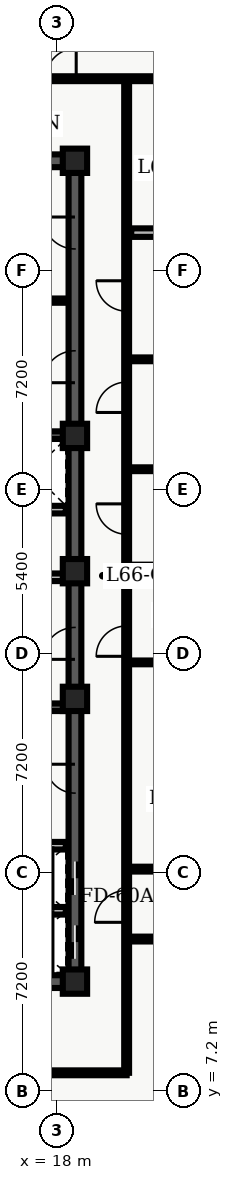
"""IFC4 building model, lengths in metres.
Left out: names, types, materials, properties, quantities, classifications, styles, units other than length and angle.
Written with IfcOpenShell. Run it as: python <this file> out.ifc"""

import sys

from ifc_helpers import new_model, entity, si_unit, converted_unit, direction, frame, origin_with_axes, origin_2d_with_axis, place, context, subcontext, project, spatial, polyline, rectangle, outline, extrude, element, fill, save


model = new_model("IFC4")
c1 = context("Model", 3, precision=1e-05, world=origin_with_axes(), true_north=direction((0.0, 1.0)))
c2 = subcontext(c1, "Body", "Model", "MODEL_VIEW")
j1 = project(units=[si_unit("LENGTHUNIT", "METRE"), converted_unit("PLANEANGLEUNIT", "DEGREE", entity("IfcPlaneAngleMeasure", 0.017), si_unit("PLANEANGLEUNIT", "RADIAN"), dimensions=[0, 0, 0, 0, 0, 0, 0])], contexts=[c1])
p1 = place(None, origin_with_axes())
s1 = spatial("IfcSite", under=j1, at=p1, CompositionType="ELEMENT")
p2 = place(p1, origin_with_axes())
s2 = spatial("IfcBuilding", under=s1, at=p2, CompositionType="ELEMENT")
p3 = place(p2, frame((0.0, 0.0, 268.5), z_axis=(0.0, 0.0, 1.0), x_axis=(1.0, 0.0, 0.0)))
s3 = spatial("IfcBuildingStorey", under=s2, at=p3, CompositionType="ELEMENT", Elevation=268.5)
p4 = place(p3, frame((11.4, 10.8, 0.0), z_axis=(0.0, 0.0, 1.0), x_axis=(1.0, 0.0, 0.0)))
e1 = element("IfcWall", 1, at=p4, inside=s3, PredefinedType="SHEAR", context=c2, shape_type="SweptSolid", body=[
    extrude(outline(polyline([(0.0, -0.21), (7.2, -0.21), (7.2, 0.21), (0.0, 0.21), (0.0, -0.21)])), origin_with_axes(), (0.0, 0.0, 1.0), 3.66),
])
p5 = place(p4, frame((2.625, 0.0, 0.0), z_axis=(0.0, 0.0, 1.0), x_axis=(1.0, 0.0, 0.0)))
e2 = element("IfcOpeningElement", 2, at=p5, cuts=e1, PredefinedType="OPENING", context=c2, shape_type="SweptSolid", body=[
    extrude(rectangle(XDim=1.05, YDim=0.44, at=origin_2d_with_axis()), origin_with_axes(), (0.0, 0.0, 1.0), 2.15),
])
p6 = place(p3, frame((11.4, 37.8, 0.0), z_axis=(0.0, 0.0, 1.0), x_axis=(1.0, 0.0, 0.0)))
e3 = element("IfcWall", 3, at=p6, inside=s3, PredefinedType="SHEAR", context=c2, shape_type="SweptSolid", body=[
    extrude(outline(polyline([(0.0, -0.21), (7.2, -0.21), (7.2, 0.21), (0.0, 0.21), (0.0, -0.21)])), origin_with_axes(), (0.0, 0.0, 1.0), 3.66),
])
p7 = place(p6, frame((2.625, 0.0, 0.0), z_axis=(0.0, 0.0, 1.0), x_axis=(1.0, 0.0, 0.0)))
e4 = element("IfcOpeningElement", 4, at=p7, cuts=e3, PredefinedType="OPENING", context=c2, shape_type="SweptSolid", body=[
    extrude(rectangle(XDim=1.05, YDim=0.44, at=origin_2d_with_axis()), origin_with_axes(), (0.0, 0.0, 1.0), 2.15),
])
p8 = place(p3, frame((18.6, 10.8, 0.0), z_axis=(0.0, 0.0, 1.0), x_axis=(0.0, 1.0, 0.0)))
e5 = element("IfcWall", 5, at=p8, inside=s3, PredefinedType="SHEAR", context=c2, shape_type="SweptSolid", body=[
    extrude(outline(polyline([(0.0, -0.21), (13.5, -0.21), (13.5, 0.21), (0.0, 0.21), (0.0, -0.21)])), origin_with_axes(), (0.0, 0.0, 1.0), 3.66),
])
p9 = place(p8, frame((1.3, 0.0, 0.0), z_axis=(0.0, 0.0, 1.0), x_axis=(1.0, 0.0, 0.0)))
e6 = element("IfcOpeningElement", 6, at=p9, cuts=e5, PredefinedType="OPENING", context=c2, shape_type="SweptSolid", body=[
    extrude(rectangle(XDim=1.1, YDim=0.44, at=origin_2d_with_axis()), origin_with_axes(), (0.0, 0.0, 1.0), 2.15),
])
p10 = place(p8, frame((3.4, 0.0, 0.0), z_axis=(0.0, 0.0, 1.0), x_axis=(1.0, 0.0, 0.0)))
e7 = element("IfcOpeningElement", 7, at=p10, cuts=e5, PredefinedType="OPENING", context=c2, shape_type="SweptSolid", body=[
    extrude(rectangle(XDim=1.1, YDim=0.44, at=origin_2d_with_axis()), origin_with_axes(), (0.0, 0.0, 1.0), 2.15),
])
p11 = place(p8, frame((11.125, 0.0, 0.0), z_axis=(0.0, 0.0, 1.0), x_axis=(1.0, 0.0, 0.0)))
e8 = element("IfcOpeningElement", 8, at=p11, cuts=e5, PredefinedType="OPENING", context=c2, shape_type="SweptSolid", body=[
    extrude(rectangle(XDim=1.05, YDim=0.44, at=origin_2d_with_axis()), origin_with_axes(), (0.0, 0.0, 1.0), 2.15),
])
p12 = place(p8, frame((6.675, 0.0, 0.0), z_axis=(0.0, 0.0, 1.0), x_axis=(1.0, 0.0, 0.0)))
e9 = element("IfcOpeningElement", 9, at=p12, cuts=e5, PredefinedType="OPENING", context=c2, shape_type="SweptSolid", body=[
    extrude(rectangle(XDim=0.95, YDim=0.44, at=origin_2d_with_axis()), origin_with_axes(), (0.0, 0.0, 1.0), 2.15),
])
p13 = place(p3, frame((18.6, 24.3, 0.0), z_axis=(0.0, 0.0, 1.0), x_axis=(0.0, 1.0, 0.0)))
e10 = element("IfcWall", 10, at=p13, inside=s3, PredefinedType="SHEAR", context=c2, shape_type="SweptSolid", body=[
    extrude(outline(polyline([(0.0, -0.21), (13.5, -0.21), (13.5, 0.21), (0.0, 0.21), (0.0, -0.21)])), origin_with_axes(), (0.0, 0.0, 1.0), 3.66),
])
p14 = place(p13, frame((6.725, 0.0, 0.0), z_axis=(0.0, 0.0, 1.0), x_axis=(1.0, 0.0, 0.0)))
e11 = element("IfcOpeningElement", 11, at=p14, cuts=e10, PredefinedType="OPENING", context=c2, shape_type="SweptSolid", body=[
    extrude(rectangle(XDim=1.05, YDim=0.44, at=origin_2d_with_axis()), origin_with_axes(), (0.0, 0.0, 1.0), 2.15),
])
p15 = place(p13, frame((11.125, 0.0, 0.0), z_axis=(0.0, 0.0, 1.0), x_axis=(1.0, 0.0, 0.0)))
e12 = element("IfcOpeningElement", 12, at=p15, cuts=e10, PredefinedType="OPENING", context=c2, shape_type="SweptSolid", body=[
    extrude(rectangle(XDim=1.05, YDim=0.44, at=origin_2d_with_axis()), origin_with_axes(), (0.0, 0.0, 1.0), 2.15),
])
for number, where, z_axis, x_axis in (
    (13, (11.61, 19.825, 0.0), (0.0, 0.0, 1.0), (1.0, 0.0, 0.0)),
    (14, (11.61, 28.775, 0.0), (0.0, 0.0, 1.0), (1.0, 0.0, 0.0)),
):
    element("IfcWall", number, at=place(p3, frame(where, z_axis=z_axis, x_axis=x_axis)), inside=s3, PredefinedType="SHEAR", context=c2, shape_type="SweptSolid", body=[
        extrude(outline(polyline([(0.0, -0.125), (6.78, -0.125), (6.78, 0.125), (0.0, 0.125), (0.0, -0.125)])), origin_with_axes(), (0.0, 0.0, 1.0), 3.66),
    ])
p16 = place(p3, frame((11.7, 24.1, 0.0), z_axis=(0.0, 0.0, 1.0), x_axis=(1.0, 0.0, 0.0)))
e15 = element("IfcWall", 15, at=p16, inside=s3, PredefinedType="SOLIDWALL", context=c2, shape_type="SweptSolid", body=[
    extrude(outline(polyline([(0.0, -0.125), (6.6, -0.125), (6.6, 0.125), (0.0, 0.125), (0.0, -0.125)])), origin_with_axes(), (0.0, 0.0, 1.0), 2.7),
])
p17 = place(p16, frame((3.6, 0.0, 0.0), z_axis=(0.0, 0.0, 1.0), x_axis=(1.0, 0.0, 0.0)))
e16 = element("IfcOpeningElement", 16, at=p17, cuts=e15, PredefinedType="OPENING", context=c2, shape_type="SweptSolid", body=[
    extrude(rectangle(XDim=0.9, YDim=0.27, at=origin_2d_with_axis()), origin_with_axes(), (0.0, 0.0, 1.0), 2.15),
])
p18 = place(p16, frame((5.65, 0.0, 0.0), z_axis=(0.0, 0.0, 1.0), x_axis=(1.0, 0.0, 0.0)))
e17 = element("IfcOpeningElement", 17, at=p18, cuts=e15, PredefinedType="OPENING", context=c2, shape_type="SweptSolid", body=[
    extrude(rectangle(XDim=0.9, YDim=0.27, at=origin_2d_with_axis()), origin_with_axes(), (0.0, 0.0, 1.0), 2.15),
])
p19 = place(p3, frame((11.7, 26.325, 0.0), z_axis=(0.0, 0.0, 1.0), x_axis=(1.0, 0.0, 0.0)))
e18 = element("IfcWall", 18, at=p19, inside=s3, PredefinedType="SOLIDWALL", context=c2, shape_type="SweptSolid", body=[
    extrude(outline(polyline([(0.0, -0.125), (6.6, -0.125), (6.6, 0.125), (0.0, 0.125), (0.0, -0.125)])), origin_with_axes(), (0.0, 0.0, 1.0), 2.7),
])
p20 = place(p19, frame((3.5, 0.0, 0.0), z_axis=(0.0, 0.0, 1.0), x_axis=(1.0, 0.0, 0.0)))
e19 = element("IfcOpeningElement", 19, at=p20, cuts=e18, PredefinedType="OPENING", context=c2, shape_type="SweptSolid", body=[
    extrude(rectangle(XDim=0.9, YDim=0.27, at=origin_2d_with_axis()), origin_with_axes(), (0.0, 0.0, 1.0), 2.15),
])
for number, where, z_axis, x_axis in (
    (20, (18.6, 10.8, 0.0), (0.0, 0.0, 1.0), (1.0, 0.0, 0.0)),
    (21, (18.6, 20.1, 0.0), (0.0, 0.0, 1.0), (1.0, 0.0, 0.0)),
    (22, (18.6, 24.3, 0.0), (0.0, 0.0, 1.0), (1.0, 0.0, 0.0)),
    (23, (18.6, 28.75, 0.0), (0.0, 0.0, 1.0), (1.0, 0.0, 0.0)),
    (24, (18.6, 37.8, 0.0), (0.0, 0.0, 1.0), (1.0, 0.0, 0.0)),
):
    element("IfcColumn", number, at=place(p3, frame(where, z_axis=z_axis, x_axis=x_axis)), inside=s3, PredefinedType="COLUMN", context=c2, shape_type="SweptSolid", body=[
        extrude(rectangle(XDim=0.8, YDim=0.8, at=origin_2d_with_axis()), origin_with_axes(), (0.0, 0.0, 1.0), 3.9),
    ])
for number, where, z_axis, x_axis in (
    (25, (15.84, 13.13, 0.0), (0.0, 0.0, 1.0), (1.0, 0.0, 0.0)),
    (26, (15.84, 15.27, 0.0), (0.0, 0.0, 1.0), (1.0, 0.0, 0.0)),
):
    element("IfcWall", number, at=place(p3, frame(where, z_axis=z_axis, x_axis=x_axis)), inside=s3, PredefinedType="SOLIDWALL", context=c2, shape_type="SweptSolid", body=[
        extrude(outline(polyline([(0.0, -0.125), (2.46, -0.125), (2.46, 0.125), (0.0, 0.125), (0.0, -0.125)])), origin_with_axes(), (0.0, 0.0, 1.0), 2.7),
    ])
p21 = place(p3, frame((15.84, 33.2, 0.0), z_axis=(0.0, 0.0, 1.0), x_axis=(1.0, 0.0, 0.0)))
e27 = element("IfcWall", 27, at=p21, inside=s3, PredefinedType="PARTITIONING", context=c2, shape_type="SweptSolid", body=[
    extrude(outline(polyline([(0.0, -0.07), (2.46, -0.07), (2.46, 0.07), (0.0, 0.07), (0.0, -0.07)])), origin_with_axes(), (0.0, 0.0, 1.0), 2.7),
])
p22 = place(p3, frame((8.135, 7.8, 0.0), z_axis=(0.0, 0.0, 1.0), x_axis=(1.0, 0.0, 0.0)))
e28 = element("IfcWall", 28, at=p22, inside=s3, PredefinedType="PARTITIONING", context=c2, shape_type="SweptSolid", body=[
    extrude(outline(polyline([(0.0, -0.08), (12.165, -0.08), (12.165, 0.08), (0.0, 0.08), (0.0, -0.08)])), origin_with_axes(), (0.0, 0.0, 1.0), 2.7),
])
p23 = place(p22, frame((3.967, 0.0, 0.0), z_axis=(0.0, 0.0, 1.0), x_axis=(1.0, 0.0, 0.0)))
e29 = element("IfcOpeningElement", 29, at=p23, cuts=e28, PredefinedType="OPENING", context=c2, shape_type="SweptSolid", body=[
    extrude(rectangle(XDim=1.0, YDim=0.18, at=origin_2d_with_axis()), origin_with_axes(), (0.0, 0.0, 1.0), 2.15),
])
p24 = place(p22, frame((8.768, 0.0, 0.0), z_axis=(0.0, 0.0, 1.0), x_axis=(1.0, 0.0, 0.0)))
e30 = element("IfcOpeningElement", 30, at=p24, cuts=e28, PredefinedType="OPENING", context=c2, shape_type="SweptSolid", body=[
    extrude(rectangle(XDim=1.0, YDim=0.18, at=origin_2d_with_axis()), origin_with_axes(), (0.0, 0.0, 1.0), 2.15),
])
p25 = place(p3, frame((8.135, 40.5, 0.0), z_axis=(0.0, 0.0, 1.0), x_axis=(1.0, 0.0, 0.0)))
e31 = element("IfcWall", 31, at=p25, inside=s3, PredefinedType="PARTITIONING", context=c2, shape_type="SweptSolid", body=[
    extrude(outline(polyline([(0.0, -0.08), (23.93, -0.08), (23.93, 0.08), (0.0, 0.08), (0.0, -0.08)])), origin_with_axes(), (0.0, 0.0, 1.0), 2.7),
])
p26 = place(p25, frame((0.76, 0.0, 0.0), z_axis=(0.0, 0.0, 1.0), x_axis=(1.0, 0.0, 0.0)))
e32 = element("IfcOpeningElement", 32, at=p26, cuts=e31, PredefinedType="OPENING", context=c2, shape_type="SweptSolid", body=[
    extrude(rectangle(XDim=1.0, YDim=0.18, at=origin_2d_with_axis()), origin_with_axes(), (0.0, 0.0, 1.0), 2.15),
])
p27 = place(p25, frame((4.39, 0.0, 0.0), z_axis=(0.0, 0.0, 1.0), x_axis=(1.0, 0.0, 0.0)))
e33 = element("IfcOpeningElement", 33, at=p27, cuts=e31, PredefinedType="OPENING", context=c2, shape_type="SweptSolid", body=[
    extrude(rectangle(XDim=1.0, YDim=0.18, at=origin_2d_with_axis()), origin_with_axes(), (0.0, 0.0, 1.0), 2.15),
])
p28 = place(p25, frame((7.051, 0.0, 0.0), z_axis=(0.0, 0.0, 1.0), x_axis=(1.0, 0.0, 0.0)))
e34 = element("IfcOpeningElement", 34, at=p28, cuts=e31, PredefinedType="OPENING", context=c2, shape_type="SweptSolid", body=[
    extrude(rectangle(XDim=1.0, YDim=0.18, at=origin_2d_with_axis()), origin_with_axes(), (0.0, 0.0, 1.0), 2.15),
])
p29 = place(p25, frame((10.006, 0.0, 0.0), z_axis=(0.0, 0.0, 1.0), x_axis=(1.0, 0.0, 0.0)))
e35 = element("IfcOpeningElement", 35, at=p29, cuts=e31, PredefinedType="OPENING", context=c2, shape_type="SweptSolid", body=[
    extrude(rectangle(XDim=1.0, YDim=0.18, at=origin_2d_with_axis()), origin_with_axes(), (0.0, 0.0, 1.0), 2.15),
])
p30 = place(p3, frame((20.3, 7.8, 0.0), z_axis=(0.0, 0.0, 1.0), x_axis=(0.0, 1.0, 0.0)))
e36 = element("IfcWall", 36, at=p30, inside=s3, PredefinedType="PARTITIONING", context=c2, shape_type="SweptSolid", body=[
    extrude(outline(polyline([(0.0, -0.08), (32.7, -0.08), (32.7, 0.08), (0.0, 0.08), (0.0, -0.08)])), origin_with_axes(), (0.0, 0.0, 1.0), 2.7),
])
p31 = place(p30, frame((14.2, 0.0, 0.0), z_axis=(0.0, 0.0, 1.0), x_axis=(1.0, 0.0, 0.0)))
e37 = element("IfcOpeningElement", 37, at=p31, cuts=e36, PredefinedType="OPENING", context=c2, shape_type="SweptSolid", body=[
    extrude(rectangle(XDim=1.0, YDim=0.18, at=origin_2d_with_axis()), origin_with_axes(), (0.0, 0.0, 1.0), 2.15),
])
p32 = place(p30, frame((18.215, 0.0, 0.0), z_axis=(0.0, 0.0, 1.0), x_axis=(1.0, 0.0, 0.0)))
e38 = element("IfcOpeningElement", 38, at=p32, cuts=e36, PredefinedType="OPENING", context=c2, shape_type="SweptSolid", body=[
    extrude(rectangle(XDim=1.0, YDim=0.18, at=origin_2d_with_axis()), origin_with_axes(), (0.0, 0.0, 1.0), 2.15),
])
p33 = place(p30, frame((22.221, 0.0, 0.0), z_axis=(0.0, 0.0, 1.0), x_axis=(1.0, 0.0, 0.0)))
e39 = element("IfcOpeningElement", 39, at=p33, cuts=e36, PredefinedType="OPENING", context=c2, shape_type="SweptSolid", body=[
    extrude(rectangle(XDim=1.0, YDim=0.18, at=origin_2d_with_axis()), origin_with_axes(), (0.0, 0.0, 1.0), 2.15),
])
p34 = place(p30, frame((25.553, 0.0, 0.0), z_axis=(0.0, 0.0, 1.0), x_axis=(1.0, 0.0, 0.0)))
e40 = element("IfcOpeningElement", 40, at=p34, cuts=e36, PredefinedType="OPENING", context=c2, shape_type="SweptSolid", body=[
    extrude(rectangle(XDim=1.0, YDim=0.18, at=origin_2d_with_axis()), origin_with_axes(), (0.0, 0.0, 1.0), 2.15),
])
p35 = place(p30, frame((5.475, 0.0, 0.0), z_axis=(0.0, 0.0, 1.0), x_axis=(1.0, 0.0, 0.0)))
e41 = element("IfcOpeningElement", 41, at=p35, cuts=e36, PredefinedType="OPENING", context=c2, shape_type="SweptSolid", body=[
    extrude(rectangle(XDim=1.05, YDim=0.18, at=origin_2d_with_axis()), origin_with_axes(), (0.0, 0.0, 1.0), 2.15),
])
p36 = place(p3, frame((20.45, 24.375, 0.0), z_axis=(0.0, 0.0, 1.0), x_axis=(1.0, 0.0, 0.0)))
e42 = element("IfcWall", 42, at=p36, inside=s3, PredefinedType="PARTITIONING", context=c2, shape_type="SweptSolid", body=[
    extrude(outline(polyline([(0.0, -0.14), (11.615, -0.14), (11.615, 0.14), (0.0, 0.14), (0.0, -0.14)])), origin_with_axes(), (0.0, 0.0, 1.0), 2.7),
])
for number, where, z_axis, x_axis in (
    (43, (20.45, 27.654, 0.0), (0.0, 0.0, 1.0), (1.0, 0.0, 0.0)),
    (44, (20.45, 31.269, 0.0), (0.0, 0.0, 1.0), (1.0, 0.0, 0.0)),
):
    element("IfcWall", number, at=place(p3, frame(where, z_axis=z_axis, x_axis=x_axis)), inside=s3, PredefinedType="PARTITIONING", context=c2, shape_type="SweptSolid", body=[
        extrude(outline(polyline([(0.0, -0.062), (11.615, -0.062), (11.615, 0.062), (0.0, 0.062), (0.0, -0.062)])), origin_with_axes(), (0.0, 0.0, 1.0), 2.7),
    ])
p37 = place(p3, frame((20.45, 35.437, 0.0), z_axis=(0.0, 0.0, 1.0), x_axis=(1.0, 0.0, 0.0)))
e45 = element("IfcWall", 45, at=p37, inside=s3, PredefinedType="PARTITIONING", context=c2, shape_type="SweptSolid", body=[
    extrude(outline(polyline([(0.0, -0.14), (11.615, -0.14), (11.615, 0.14), (0.0, 0.14), (0.0, -0.14)])), origin_with_axes(), (0.0, 0.0, 1.0), 2.7),
])
p38 = place(p37, frame((3.375, 0.0, 0.0), z_axis=(0.0, 0.0, 1.0), x_axis=(1.0, 0.0, 0.0)))
e46 = element("IfcOpeningElement", 46, at=p38, cuts=e45, PredefinedType="OPENING", context=c2, shape_type="SweptSolid", body=[
    extrude(rectangle(XDim=0.95, YDim=0.3, at=origin_2d_with_axis()), origin_with_axes(), (0.0, 0.0, 1.0), 2.15),
])
p39 = place(p3, frame((20.3, 12.2, 0.0), z_axis=(0.0, 0.0, 1.0), x_axis=(1.0, 0.0, 0.0)))
e47 = element("IfcWall", 47, at=p39, inside=s3, PredefinedType="PARTITIONING", context=c2, shape_type="SweptSolid", body=[
    extrude(outline(polyline([(0.0, -0.08), (14.85, -0.08), (14.85, 0.08), (0.0, 0.08), (0.0, -0.08)])), origin_with_axes(), (0.0, 0.0, 1.0), 2.7),
])
p40 = place(p39, frame((8.355, 0.0, 0.0), z_axis=(0.0, 0.0, 1.0), x_axis=(1.0, 0.0, 0.0)))
e48 = element("IfcOpeningElement", 48, at=p40, cuts=e47, PredefinedType="OPENING", context=c2, shape_type="SweptSolid", body=[
    extrude(rectangle(XDim=1.0, YDim=0.18, at=origin_2d_with_axis()), origin_with_axes(), (0.0, 0.0, 1.0), 2.15),
])
p41 = place(p3, frame((20.3, 14.5, 0.0), z_axis=(0.0, 0.0, 1.0), x_axis=(1.0, 0.0, 0.0)))
e49 = element("IfcWall", 49, at=p41, inside=s3, PredefinedType="PARTITIONING", context=c2, shape_type="SweptSolid", body=[
    extrude(outline(polyline([(0.0, -0.08), (14.85, -0.08), (14.85, 0.08), (0.0, 0.08), (0.0, -0.08)])), origin_with_axes(), (0.0, 0.0, 1.0), 2.7),
])
p42 = place(p41, frame((2.495, 0.0, 0.0), z_axis=(0.0, 0.0, 1.0), x_axis=(1.0, 0.0, 0.0)))
e50 = element("IfcOpeningElement", 50, at=p42, cuts=e49, PredefinedType="OPENING", context=c2, shape_type="SweptSolid", body=[
    extrude(rectangle(XDim=1.0, YDim=0.18, at=origin_2d_with_axis()), origin_with_axes(), (0.0, 0.0, 1.0), 2.15),
])
p43 = place(p41, frame((6.056, 0.0, 0.0), z_axis=(0.0, 0.0, 1.0), x_axis=(1.0, 0.0, 0.0)))
e51 = element("IfcOpeningElement", 51, at=p43, cuts=e49, PredefinedType="OPENING", context=c2, shape_type="SweptSolid", body=[
    extrude(rectangle(XDim=1.0, YDim=0.18, at=origin_2d_with_axis()), origin_with_axes(), (0.0, 0.0, 1.0), 2.15),
])
p44 = place(p41, frame((9.19, 0.0, 0.0), z_axis=(0.0, 0.0, 1.0), x_axis=(1.0, 0.0, 0.0)))
e52 = element("IfcOpeningElement", 52, at=p44, cuts=e49, PredefinedType="OPENING", context=c2, shape_type="SweptSolid", body=[
    extrude(rectangle(XDim=1.0, YDim=0.18, at=origin_2d_with_axis()), origin_with_axes(), (0.0, 0.0, 1.0), 2.15),
])
p45 = place(p41, frame((12.925, 0.0, 0.0), z_axis=(0.0, 0.0, 1.0), x_axis=(1.0, 0.0, 0.0)))
e53 = element("IfcOpeningElement", 53, at=p45, cuts=e49, PredefinedType="OPENING", context=c2, shape_type="SweptSolid", body=[
    extrude(rectangle(XDim=1.0, YDim=0.18, at=origin_2d_with_axis()), origin_with_axes(), (0.0, 0.0, 1.0), 2.15),
])
p46 = place(p3, frame((20.3, 21.3, 0.0), z_axis=(0.0, 0.0, 1.0), x_axis=(1.0, 0.0, 0.0)))
e54 = element("IfcWall", 54, at=p46, inside=s3, PredefinedType="PARTITIONING", context=c2, shape_type="SweptSolid", body=[
    extrude(outline(polyline([(0.0, -0.062), (11.765, -0.062), (11.765, 0.062), (0.0, 0.062), (0.0, -0.062)])), origin_with_axes(), (0.0, 0.0, 1.0), 2.7),
])
p47 = place(p8, frame((1.3, 0.0, 0.0), z_axis=(0.0, 0.0, 1.0), x_axis=(1.0, 0.0, 0.0)))
e55 = element("IfcDoor", 55, at=p47, inside=s3, OperationType="SLIDING_TO_LEFT", PredefinedType="DOOR", context=c2, shape_type="SweptSolid", body=[
    extrude(rectangle(XDim=1.1, YDim=0.09, at=origin_2d_with_axis()), origin_with_axes(), (0.0, 0.0, 1.0), 2.15),
])
fill(e6, e55)
p48 = place(p8, frame((3.4, 0.0, 0.0), z_axis=(0.0, 0.0, 1.0), x_axis=(1.0, 0.0, 0.0)))
e56 = element("IfcDoor", 56, at=p48, inside=s3, OperationType="SLIDING_TO_RIGHT", PredefinedType="DOOR", context=c2, shape_type="SweptSolid", body=[
    extrude(rectangle(XDim=1.1, YDim=0.09, at=origin_2d_with_axis()), origin_with_axes(), (0.0, 0.0, 1.0), 2.15),
])
fill(e7, e56)
p49 = place(p8, frame((11.125, 0.0, 0.0), z_axis=(0.0, 0.0, 1.0), x_axis=(1.0, 0.0, 0.0)))
e57 = element("IfcDoor", 57, at=p49, inside=s3, OperationType="SINGLE_SWING_LEFT", PredefinedType="DOOR", context=c2, shape_type="SweptSolid", body=[
    extrude(rectangle(XDim=1.05, YDim=0.09, at=origin_2d_with_axis()), origin_with_axes(), (0.0, 0.0, 1.0), 2.15),
])
fill(e8, e57)
p50 = place(p8, frame((6.675, 0.0, 0.0), z_axis=(0.0, 0.0, 1.0), x_axis=(1.0, 0.0, 0.0)))
e58 = element("IfcDoor", 58, at=p50, inside=s3, OperationType="SINGLE_SWING_RIGHT", PredefinedType="DOOR", context=c2, shape_type="SweptSolid", body=[
    extrude(rectangle(XDim=0.95, YDim=0.09, at=origin_2d_with_axis()), origin_with_axes(), (0.0, 0.0, 1.0), 2.15),
])
fill(e9, e58)
p51 = place(p13, frame((6.725, 0.0, 0.0), z_axis=(0.0, 0.0, 1.0), x_axis=(1.0, 0.0, 0.0)))
e59 = element("IfcDoor", 59, at=p51, inside=s3, OperationType="SINGLE_SWING_LEFT", PredefinedType="DOOR", context=c2, shape_type="SweptSolid", body=[
    extrude(rectangle(XDim=1.05, YDim=0.09, at=origin_2d_with_axis()), origin_with_axes(), (0.0, 0.0, 1.0), 2.15),
])
fill(e11, e59)
p52 = place(p13, frame((11.125, 0.0, 0.0), z_axis=(0.0, 0.0, 1.0), x_axis=(1.0, 0.0, 0.0)))
e60 = element("IfcDoor", 60, at=p52, inside=s3, OperationType="SINGLE_SWING_RIGHT", PredefinedType="DOOR", context=c2, shape_type="SweptSolid", body=[
    extrude(rectangle(XDim=1.05, YDim=0.09, at=origin_2d_with_axis()), origin_with_axes(), (0.0, 0.0, 1.0), 2.15),
])
fill(e12, e60)
p53 = place(p25, frame((10.006, 0.0, 0.0), z_axis=(0.0, 0.0, 1.0), x_axis=(1.0, 0.0, 0.0)))
e61 = element("IfcDoor", 61, at=p53, inside=s3, OperationType="SINGLE_SWING_RIGHT", PredefinedType="DOOR", context=c2, shape_type="SweptSolid", body=[
    extrude(rectangle(XDim=1.0, YDim=0.09, at=origin_2d_with_axis()), origin_with_axes(), (0.0, 0.0, 1.0), 2.15),
])
fill(e35, e61)
p54 = place(p30, frame((14.2, 0.0, 0.0), z_axis=(0.0, 0.0, 1.0), x_axis=(1.0, 0.0, 0.0)))
e62 = element("IfcDoor", 62, at=p54, inside=s3, OperationType="SINGLE_SWING_LEFT", PredefinedType="DOOR", context=c2, shape_type="SweptSolid", body=[
    extrude(rectangle(XDim=1.0, YDim=0.09, at=origin_2d_with_axis()), origin_with_axes(), (0.0, 0.0, 1.0), 2.15),
])
fill(e37, e62)
p55 = place(p30, frame((18.215, 0.0, 0.0), z_axis=(0.0, 0.0, 1.0), x_axis=(1.0, 0.0, 0.0)))
e63 = element("IfcDoor", 63, at=p55, inside=s3, OperationType="SINGLE_SWING_RIGHT", PredefinedType="DOOR", context=c2, shape_type="SweptSolid", body=[
    extrude(rectangle(XDim=1.0, YDim=0.09, at=origin_2d_with_axis()), origin_with_axes(), (0.0, 0.0, 1.0), 2.15),
])
fill(e38, e63)
p56 = place(p30, frame((22.221, 0.0, 0.0), z_axis=(0.0, 0.0, 1.0), x_axis=(1.0, 0.0, 0.0)))
e64 = element("IfcDoor", 64, at=p56, inside=s3, OperationType="SINGLE_SWING_LEFT", PredefinedType="DOOR", context=c2, shape_type="SweptSolid", body=[
    extrude(rectangle(XDim=1.0, YDim=0.09, at=origin_2d_with_axis()), origin_with_axes(), (0.0, 0.0, 1.0), 2.15),
])
fill(e39, e64)
p57 = place(p30, frame((25.553, 0.0, 0.0), z_axis=(0.0, 0.0, 1.0), x_axis=(1.0, 0.0, 0.0)))
e65 = element("IfcDoor", 65, at=p57, inside=s3, OperationType="SINGLE_SWING_RIGHT", PredefinedType="DOOR", context=c2, shape_type="SweptSolid", body=[
    extrude(rectangle(XDim=1.0, YDim=0.09, at=origin_2d_with_axis()), origin_with_axes(), (0.0, 0.0, 1.0), 2.15),
])
fill(e40, e65)
p58 = place(p30, frame((5.475, 0.0, 0.0), z_axis=(0.0, 0.0, 1.0), x_axis=(1.0, 0.0, 0.0)))
e66 = element("IfcDoor", 66, at=p58, inside=s3, OperationType="SINGLE_SWING_LEFT", PredefinedType="DOOR", context=c2, shape_type="SweptSolid", body=[
    extrude(rectangle(XDim=1.05, YDim=0.09, at=origin_2d_with_axis()), origin_with_axes(), (0.0, 0.0, 1.0), 2.15),
])
fill(e41, e66)
save(model, sys.argv[1])
